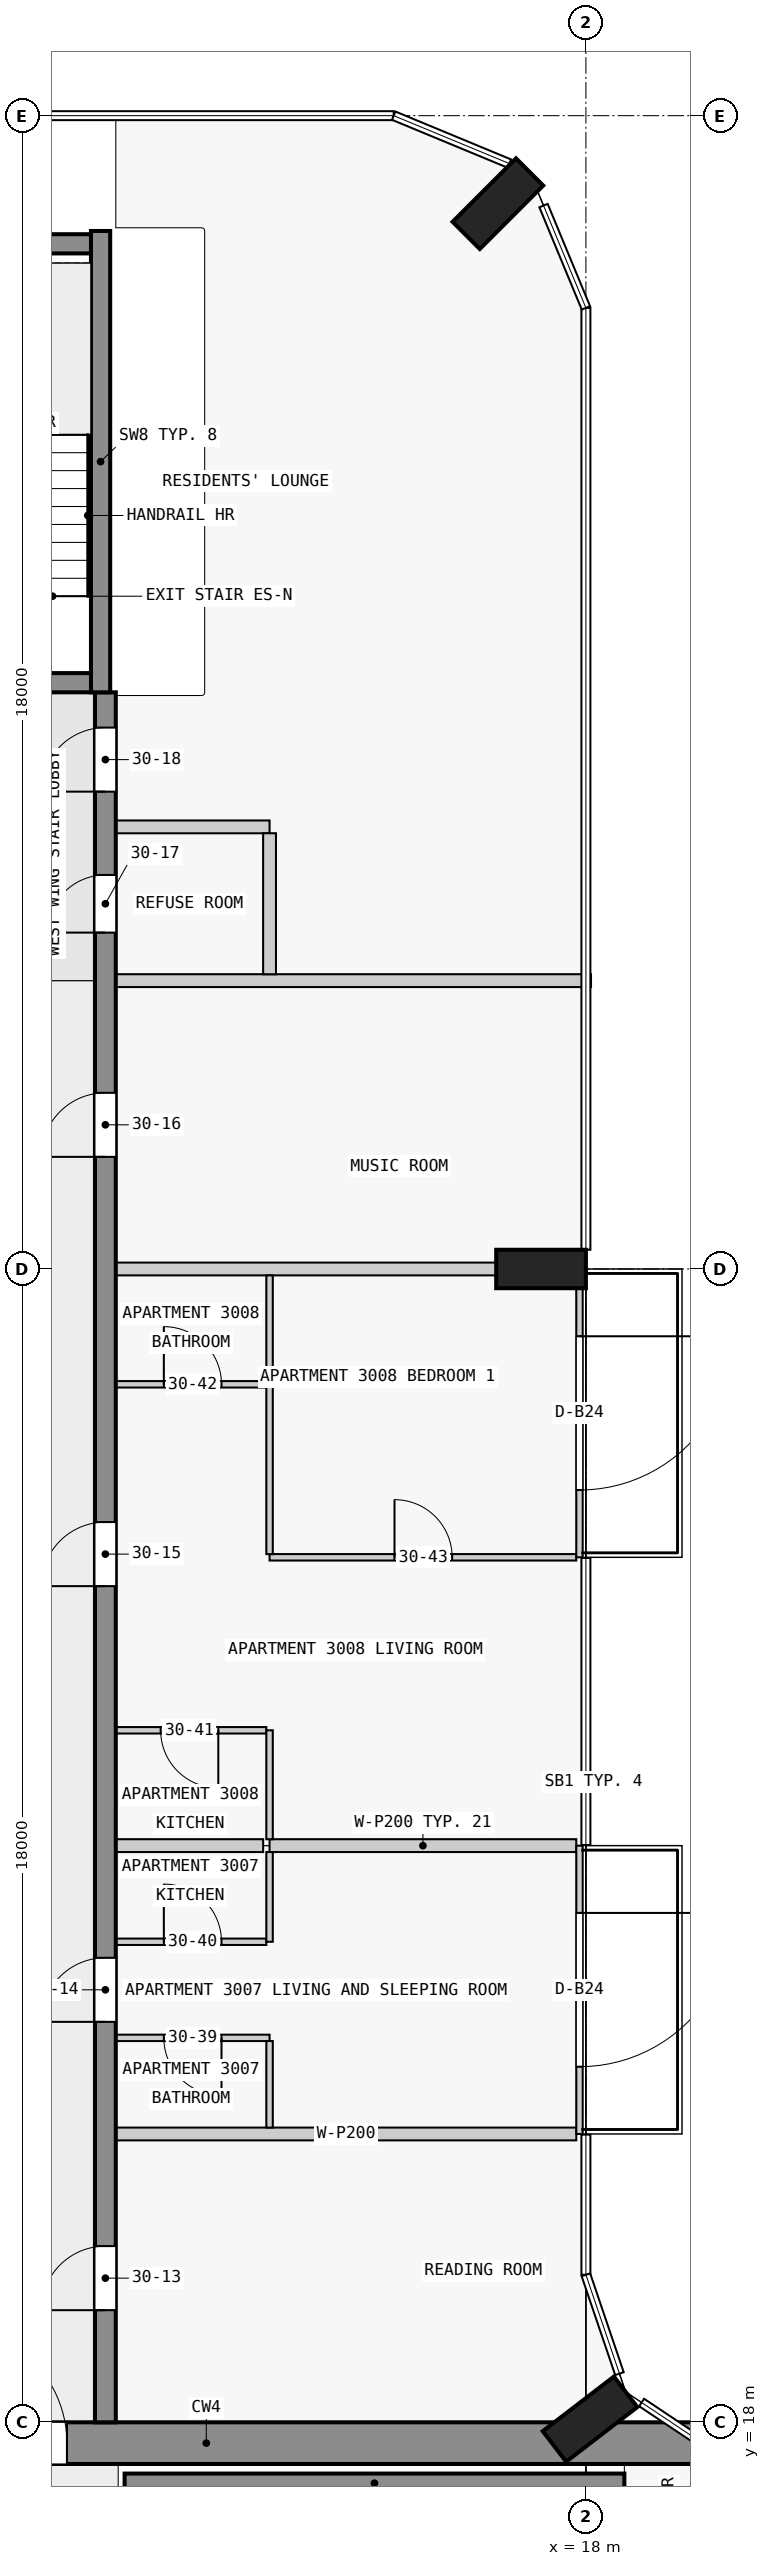
"""IFC4 building model, lengths in metres.
Left out: names, types, materials, properties, quantities, classifications, styles, units other than length and angle.
Written with IfcOpenShell. Run it as: python <this file> out.ifc"""

import sys

from ifc_helpers import new_model, si_unit, direction, frame, frame_2d, origin, origin_2d, place, context, subcontext, project, spatial, rectangle, extrude, element, fill, save


model = new_model("IFC4")
c1 = context("Model", 3, precision=1e-05, world=origin(), true_north=direction((0.0, 1.0)))
c2 = subcontext(c1, "Body", "Model", "MODEL_VIEW")
j1 = project(units=[si_unit("LENGTHUNIT", "METRE"), si_unit("PLANEANGLEUNIT", "RADIAN")], contexts=[c1])
p1 = place(None, origin())
s1 = spatial("IfcSite", under=j1, at=p1, CompositionType="ELEMENT")
p2 = place(p1, origin())
s2 = spatial("IfcBuilding", under=s1, at=p2, CompositionType="ELEMENT")
p3 = place(p2, frame((0.0, 0.0, 116.8)))
s3 = spatial("IfcBuildingStorey", under=s2, at=p3, CompositionType="ELEMENT", Elevation=116.8)
for number, where, z_axis, x_axis in (
    (1, (18.065, 18.05, 0.0), (0.0, 0.0, 1.0), (-0.609, 0.793, 0.0)),
    (2, (17.3, 36.0, 0.0), (0.0, 0.0, 1.0), (0.0, 1.0, 0.0)),
    (3, (16.626, 52.626, 0.0), (0.0, 0.0, 1.0), (-0.707, 0.707, 0.0)),
):
    element("IfcColumn", number, at=place(p3, frame(where, z_axis=z_axis, x_axis=x_axis)), inside=s3, PredefinedType="COLUMN", context=c2, shape_type="SweptSolid", body=[
        extrude(rectangle(XDim=0.6, YDim=1.4, at=origin_2d()), origin(), (0.0, 0.0, 1.0), 3.5),
    ])
p4 = place(p3, frame((1.65, 17.675, 0.0), z_axis=(0.0, 0.0, 1.0), x_axis=(1.0, 0.0, 0.0)))
e4 = element("IfcWall", 4, at=p4, inside=s3, PredefinedType="SHEAR", context=c2, shape_type="SweptSolid", body=[
    extrude(rectangle(XDim=20.85, YDim=0.65, at=frame_2d((10.425, 0.0))), origin(), (0.0, 0.0, 1.0), 3.25),
])
p5 = place(p4, frame((6.45, 0.0, 0.0)))
e5 = element("IfcOpeningElement", 5, at=p5, cuts=e4, PredefinedType="OPENING", context=c2, shape_type="SweptSolid", body=[
    extrude(rectangle(XDim=1.8, YDim=2.1, at=frame_2d((0.9, 1.05))), frame((0.0, 0.335, 0.0), z_axis=(0.0, -1.0, 0.0), x_axis=(1.0, 0.0, 0.0)), (0.0, 0.0, 1.0), 0.67),
])
p6 = place(p3, frame((10.8, 17.05, 0.0), z_axis=(0.0, 0.0, 1.0), x_axis=(1.0, 0.0, 0.0)))
e6 = element("IfcWall", 6, at=p6, inside=s3, PredefinedType="SHEAR", context=c2, shape_type="SweptSolid", body=[
    extrude(rectangle(XDim=7.8, YDim=0.3, at=frame_2d((3.9, 0.0))), origin(), (0.0, 0.0, 1.0), 3.25),
])
p7 = place(p3, frame((7.725, 45.15, 0.0), z_axis=(0.0, 0.0, 1.0), x_axis=(1.0, 0.0, 0.0)))
e7 = element("IfcWall", 7, at=p7, inside=s3, PredefinedType="SHEAR", context=c2, shape_type="SweptSolid", body=[
    extrude(rectangle(XDim=2.55, YDim=0.3, at=frame_2d((1.275, 0.0))), origin(), (0.0, 0.0, 1.0), 3.5),
])
p8 = place(p7, frame((0.725, 0.0, 0.0)))
e8 = element("IfcOpeningElement", 8, at=p8, cuts=e7, PredefinedType="OPENING", context=c2, shape_type="SweptSolid", body=[
    extrude(rectangle(XDim=1.1, YDim=2.1, at=frame_2d((0.55, 1.05))), frame((0.0, 0.16, 0.0), z_axis=(0.0, -1.0, 0.0), x_axis=(1.0, 0.0, 0.0)), (0.0, 0.0, 1.0), 0.32),
])
p9 = place(p3, frame((7.725, 52.0, 0.0), z_axis=(0.0, 0.0, 1.0), x_axis=(1.0, 0.0, 0.0)))
e9 = element("IfcWall", 9, at=p9, inside=s3, PredefinedType="SHEAR", context=c2, shape_type="SweptSolid", body=[
    extrude(rectangle(XDim=2.55, YDim=0.3, at=frame_2d((1.275, 0.0))), origin(), (0.0, 0.0, 1.0), 3.5),
])
p10 = place(p3, frame((10.425, 45.0, 0.0), z_axis=(0.0, 0.0, 1.0), x_axis=(0.0, 1.0, 0.0)))
e10 = element("IfcWall", 10, at=p10, inside=s3, PredefinedType="SHEAR", context=c2, shape_type="SweptSolid", body=[
    extrude(rectangle(XDim=7.2, YDim=0.3, at=frame_2d((3.6, 0.0))), origin(), (0.0, 0.0, 1.0), 3.5),
])
p11 = place(p3, frame((10.5, 18.0, 0.0), z_axis=(0.0, 0.0, 1.0), x_axis=(0.0, 1.0, 0.0)))
e11 = element("IfcWall", 11, at=p11, inside=s3, PredefinedType="SHEAR", context=c2, shape_type="SweptSolid", body=[
    extrude(rectangle(XDim=27.0, YDim=0.325, at=frame_2d((13.5, 0.0))), origin(), (0.0, 0.0, 1.0), 3.25),
])
p12 = place(p11, frame((1.75, 0.0, 0.0)))
e12 = element("IfcOpeningElement", 12, at=p12, cuts=e11, PredefinedType="OPENING", context=c2, shape_type="SweptSolid", body=[
    extrude(rectangle(XDim=1.0, YDim=2.1, at=frame_2d((0.5, 1.05))), frame((0.0, 0.172, 0.0), z_axis=(0.0, -1.0, 0.0), x_axis=(1.0, 0.0, 0.0)), (0.0, 0.0, 1.0), 0.345),
])
p13 = place(p11, frame((6.25, 0.0, 0.0)))
e13 = element("IfcOpeningElement", 13, at=p13, cuts=e11, PredefinedType="OPENING", context=c2, shape_type="SweptSolid", body=[
    extrude(rectangle(XDim=1.0, YDim=2.1, at=frame_2d((0.5, 1.05))), frame((0.0, 0.172, 0.0), z_axis=(0.0, -1.0, 0.0), x_axis=(1.0, 0.0, 0.0)), (0.0, 0.0, 1.0), 0.345),
])
p14 = place(p11, frame((13.05, 0.0, 0.0)))
e14 = element("IfcOpeningElement", 14, at=p14, cuts=e11, PredefinedType="OPENING", context=c2, shape_type="SweptSolid", body=[
    extrude(rectangle(XDim=1.0, YDim=2.1, at=frame_2d((0.5, 1.05))), frame((0.0, 0.172, 0.0), z_axis=(0.0, -1.0, 0.0), x_axis=(1.0, 0.0, 0.0)), (0.0, 0.0, 1.0), 0.345),
])
p15 = place(p11, frame((19.75, 0.0, 0.0)))
e15 = element("IfcOpeningElement", 15, at=p15, cuts=e11, PredefinedType="OPENING", context=c2, shape_type="SweptSolid", body=[
    extrude(rectangle(XDim=1.0, YDim=2.1, at=frame_2d((0.5, 1.05))), frame((0.0, 0.172, 0.0), z_axis=(0.0, -1.0, 0.0), x_axis=(1.0, 0.0, 0.0)), (0.0, 0.0, 1.0), 0.345),
])
p16 = place(p11, frame((23.25, 0.0, 0.0)))
e16 = element("IfcOpeningElement", 16, at=p16, cuts=e11, PredefinedType="OPENING", context=c2, shape_type="SweptSolid", body=[
    extrude(rectangle(XDim=0.9, YDim=2.1, at=frame_2d((0.45, 1.05))), frame((0.0, 0.172, 0.0), z_axis=(0.0, -1.0, 0.0), x_axis=(1.0, 0.0, 0.0)), (0.0, 0.0, 1.0), 0.345),
])
p17 = place(p11, frame((25.45, 0.0, 0.0)))
e17 = element("IfcOpeningElement", 17, at=p17, cuts=e11, PredefinedType="OPENING", context=c2, shape_type="SweptSolid", body=[
    extrude(rectangle(XDim=1.0, YDim=2.1, at=frame_2d((0.5, 1.05))), frame((0.0, 0.172, 0.0), z_axis=(0.0, -1.0, 0.0), x_axis=(1.0, 0.0, 0.0)), (0.0, 0.0, 1.0), 0.345),
])
p18 = place(p3, frame((17.9, 27.0, 0.0), z_axis=(0.0, 0.0, 1.0), x_axis=(0.0, -1.0, 0.0)))
e18 = element("IfcWall", 18, at=p18, inside=s3, PredefinedType="STANDARD", context=c2, shape_type="SweptSolid", body=[
    extrude(rectangle(XDim=4.5, YDim=0.1, at=frame_2d((2.25, 0.0))), origin(), (0.0, 0.0, 1.0), 3.25),
])
p19 = place(p18, frame((1.05, 0.0, 0.0)))
e19 = element("IfcOpeningElement", 19, at=p19, cuts=e18, PredefinedType="OPENING", context=c2, shape_type="SweptSolid", body=[
    extrude(rectangle(XDim=2.4, YDim=2.4, at=frame_2d((1.2, 1.2))), frame((0.0, 0.06, 0.0), z_axis=(0.0, -1.0, 0.0), x_axis=(1.0, 0.0, 0.0)), (0.0, 0.0, 1.0), 0.12),
])
p20 = place(p3, frame((17.9, 36.0, 0.0), z_axis=(0.0, 0.0, 1.0), x_axis=(0.0, -1.0, 0.0)))
e20 = element("IfcWall", 20, at=p20, inside=s3, PredefinedType="STANDARD", context=c2, shape_type="SweptSolid", body=[
    extrude(rectangle(XDim=4.5, YDim=0.1, at=frame_2d((2.25, 0.0))), origin(), (0.0, 0.0, 1.0), 3.25),
])
p21 = place(p20, frame((1.05, 0.0, 0.0)))
e21 = element("IfcOpeningElement", 21, at=p21, cuts=e20, PredefinedType="OPENING", context=c2, shape_type="SweptSolid", body=[
    extrude(rectangle(XDim=2.4, YDim=2.4, at=frame_2d((1.2, 1.2))), frame((0.0, 0.06, 0.0), z_axis=(0.0, -1.0, 0.0), x_axis=(1.0, 0.0, 0.0)), (0.0, 0.0, 1.0), 0.12),
])
p22 = place(p3, frame((17.85, 22.5, 0.0), z_axis=(0.0, 0.0, 1.0), x_axis=(-1.0, 0.0, 0.0)))
e22 = element("IfcWall", 22, at=p22, inside=s3, PredefinedType="PARTITIONING", context=c2, shape_type="SweptSolid", body=[
    extrude(rectangle(XDim=7.188, YDim=0.2, at=frame_2d((3.594, 0.0))), origin(), (0.0, 0.0, 1.0), 3.25),
])
p23 = place(p3, frame((13.062, 24.0, 0.0), z_axis=(0.0, 0.0, 1.0), x_axis=(-1.0, 0.0, 0.0)))
e23 = element("IfcWall", 23, at=p23, inside=s3, PredefinedType="PARTITIONING", context=c2, shape_type="SweptSolid", body=[
    extrude(rectangle(XDim=2.4, YDim=0.1, at=frame_2d((1.2, 0.0))), origin(), (0.0, 0.0, 1.0), 3.25),
])
p24 = place(p23, frame((0.75, 0.0, 0.0)))
e24 = element("IfcOpeningElement", 24, at=p24, cuts=e23, PredefinedType="OPENING", context=c2, shape_type="SweptSolid", body=[
    extrude(rectangle(XDim=0.9, YDim=2.1, at=frame_2d((0.45, 1.05))), frame((0.0, 0.06, 0.0), z_axis=(0.0, -1.0, 0.0), x_axis=(1.0, 0.0, 0.0)), (0.0, 0.0, 1.0), 0.12),
])
p25 = place(p3, frame((10.663, 25.5, 0.0), z_axis=(0.0, 0.0, 1.0), x_axis=(1.0, 0.0, 0.0)))
e25 = element("IfcWall", 25, at=p25, inside=s3, PredefinedType="PARTITIONING", context=c2, shape_type="SweptSolid", body=[
    extrude(rectangle(XDim=2.35, YDim=0.1, at=frame_2d((1.175, 0.0))), origin(), (0.0, 0.0, 1.0), 3.25),
])
p26 = place(p25, frame((0.75, 0.0, 0.0)))
e26 = element("IfcOpeningElement", 26, at=p26, cuts=e25, PredefinedType="OPENING", context=c2, shape_type="SweptSolid", body=[
    extrude(rectangle(XDim=0.9, YDim=2.1, at=frame_2d((0.45, 1.05))), frame((0.0, 0.06, 0.0), z_axis=(0.0, -1.0, 0.0), x_axis=(1.0, 0.0, 0.0)), (0.0, 0.0, 1.0), 0.12),
])
p27 = place(p3, frame((12.962, 27.0, 0.0), z_axis=(0.0, 0.0, 1.0), x_axis=(-1.0, 0.0, 0.0)))
e27 = element("IfcWall", 27, at=p27, inside=s3, PredefinedType="PARTITIONING", context=c2, shape_type="SweptSolid", body=[
    extrude(rectangle(XDim=2.3, YDim=0.2, at=frame_2d((1.15, 0.0))), origin(), (0.0, 0.0, 1.0), 3.25),
])
p28 = place(p3, frame((13.062, 27.0, 0.0), z_axis=(0.0, 0.0, 1.0), x_axis=(1.0, 0.0, 0.0)))
e28 = element("IfcWall", 28, at=p28, inside=s3, PredefinedType="PARTITIONING", context=c2, shape_type="SweptSolid", body=[
    extrude(rectangle(XDim=4.788, YDim=0.2, at=frame_2d((2.394, 0.0))), origin(), (0.0, 0.0, 1.0), 3.25),
])
p29 = place(p3, frame((13.012, 28.8, 0.0), z_axis=(0.0, 0.0, 1.0), x_axis=(-1.0, 0.0, 0.0)))
e29 = element("IfcWall", 29, at=p29, inside=s3, PredefinedType="PARTITIONING", context=c2, shape_type="SweptSolid", body=[
    extrude(rectangle(XDim=2.35, YDim=0.1, at=frame_2d((1.175, 0.0))), origin(), (0.0, 0.0, 1.0), 3.25),
])
p30 = place(p29, frame((0.75, 0.0, 0.0)))
e30 = element("IfcOpeningElement", 30, at=p30, cuts=e29, PredefinedType="OPENING", context=c2, shape_type="SweptSolid", body=[
    extrude(rectangle(XDim=0.9, YDim=2.1, at=frame_2d((0.45, 1.05))), frame((0.0, 0.06, 0.0), z_axis=(0.0, -1.0, 0.0), x_axis=(1.0, 0.0, 0.0)), (0.0, 0.0, 1.0), 0.12),
])
p31 = place(p3, frame((13.062, 31.5, 0.0), z_axis=(0.0, 0.0, 1.0), x_axis=(1.0, 0.0, 0.0)))
e31 = element("IfcWall", 31, at=p31, inside=s3, PredefinedType="PARTITIONING", context=c2, shape_type="SweptSolid", body=[
    extrude(rectangle(XDim=4.788, YDim=0.1, at=frame_2d((2.394, 0.0))), origin(), (0.0, 0.0, 1.0), 3.25),
])
p32 = place(p31, frame((1.95, 0.0, 0.0)))
e32 = element("IfcOpeningElement", 32, at=p32, cuts=e31, PredefinedType="OPENING", context=c2, shape_type="SweptSolid", body=[
    extrude(rectangle(XDim=0.9, YDim=2.1, at=frame_2d((0.45, 1.05))), frame((0.0, 0.06, 0.0), z_axis=(0.0, -1.0, 0.0), x_axis=(1.0, 0.0, 0.0)), (0.0, 0.0, 1.0), 0.12),
])
p33 = place(p3, frame((10.663, 34.2, 0.0), z_axis=(0.0, 0.0, 1.0), x_axis=(1.0, 0.0, 0.0)))
e33 = element("IfcWall", 33, at=p33, inside=s3, PredefinedType="PARTITIONING", context=c2, shape_type="SweptSolid", body=[
    extrude(rectangle(XDim=2.35, YDim=0.1, at=frame_2d((1.175, 0.0))), origin(), (0.0, 0.0, 1.0), 3.25),
])
p34 = place(p33, frame((0.75, 0.0, 0.0)))
e34 = element("IfcOpeningElement", 34, at=p34, cuts=e33, PredefinedType="OPENING", context=c2, shape_type="SweptSolid", body=[
    extrude(rectangle(XDim=0.9, YDim=2.1, at=frame_2d((0.45, 1.05))), frame((0.0, 0.06, 0.0), z_axis=(0.0, -1.0, 0.0), x_axis=(1.0, 0.0, 0.0)), (0.0, 0.0, 1.0), 0.12),
])
p35 = place(p3, frame((16.6, 36.0, 0.0), z_axis=(0.0, 0.0, 1.0), x_axis=(-1.0, 0.0, 0.0)))
e35 = element("IfcWall", 35, at=p35, inside=s3, PredefinedType="PARTITIONING", context=c2, shape_type="SweptSolid", body=[
    extrude(rectangle(XDim=5.938, YDim=0.2, at=frame_2d((2.969, 0.0))), origin(), (0.0, 0.0, 1.0), 3.25),
])
p36 = place(p3, frame((18.08, 40.5, 0.0), z_axis=(0.0, 0.0, 1.0), x_axis=(-1.0, 0.0, 0.0)))
e36 = element("IfcWall", 36, at=p36, inside=s3, PredefinedType="PARTITIONING", context=c2, shape_type="SweptSolid", body=[
    extrude(rectangle(XDim=7.417, YDim=0.2, at=frame_2d((3.709, 0.0))), origin(), (0.0, 0.0, 1.0), 3.25),
])
p37 = place(p3, frame((13.062, 42.9, 0.0), z_axis=(0.0, 0.0, 1.0), x_axis=(-1.0, 0.0, 0.0)))
e37 = element("IfcWall", 37, at=p37, inside=s3, PredefinedType="PARTITIONING", context=c2, shape_type="SweptSolid", body=[
    extrude(rectangle(XDim=2.4, YDim=0.2, at=frame_2d((1.2, 0.0))), origin(), (0.0, 0.0, 1.0), 3.25),
])
p38 = place(p3, frame((13.062, 34.2, 0.0), z_axis=(0.0, 0.0, 1.0), x_axis=(0.0, -1.0, 0.0)))
e38 = element("IfcWall", 38, at=p38, inside=s3, PredefinedType="PARTITIONING", context=c2, shape_type="SweptSolid", body=[
    extrude(rectangle(XDim=2.65, YDim=0.1, at=frame_2d((1.325, 0.0))), origin(), (0.0, 0.0, 1.0), 3.25),
])
p39 = place(p3, frame((13.062, 22.6, 0.0), z_axis=(0.0, 0.0, 1.0), x_axis=(0.0, 1.0, 0.0)))
e39 = element("IfcWall", 39, at=p39, inside=s3, PredefinedType="PARTITIONING", context=c2, shape_type="SweptSolid", body=[
    extrude(rectangle(XDim=1.35, YDim=0.1, at=frame_2d((0.675, 0.0))), origin(), (0.0, 0.0, 1.0), 3.25),
])
p40 = place(p3, frame((13.062, 25.5, 0.0), z_axis=(0.0, 0.0, 1.0), x_axis=(0.0, 1.0, 0.0)))
e40 = element("IfcWall", 40, at=p40, inside=s3, PredefinedType="PARTITIONING", context=c2, shape_type="SweptSolid", body=[
    extrude(rectangle(XDim=1.4, YDim=0.1, at=frame_2d((0.7, 0.0))), origin(), (0.0, 0.0, 1.0), 3.25),
])
p41 = place(p3, frame((13.062, 27.1, 0.0), z_axis=(0.0, 0.0, 1.0), x_axis=(0.0, 1.0, 0.0)))
e41 = element("IfcWall", 41, at=p41, inside=s3, PredefinedType="PARTITIONING", context=c2, shape_type="SweptSolid", body=[
    extrude(rectangle(XDim=1.7, YDim=0.1, at=frame_2d((0.85, 0.0))), origin(), (0.0, 0.0, 1.0), 3.25),
])
p42 = place(p3, frame((13.062, 34.25, 0.0), z_axis=(0.0, 0.0, 1.0), x_axis=(0.0, 1.0, 0.0)))
e42 = element("IfcWall", 42, at=p42, inside=s3, PredefinedType="PARTITIONING", context=c2, shape_type="SweptSolid", body=[
    extrude(rectangle(XDim=1.65, YDim=0.1, at=frame_2d((0.825, 0.0))), origin(), (0.0, 0.0, 1.0), 3.25),
])
p43 = place(p3, frame((13.062, 40.6, 0.0), z_axis=(0.0, 0.0, 1.0), x_axis=(0.0, 1.0, 0.0)))
e43 = element("IfcWall", 43, at=p43, inside=s3, PredefinedType="PARTITIONING", context=c2, shape_type="SweptSolid", body=[
    extrude(rectangle(XDim=2.2, YDim=0.2, at=frame_2d((1.1, 0.0))), origin(), (0.0, 0.0, 1.0), 3.25),
])
p44 = place(p19, origin())
e44 = element("IfcDoor", 44, at=p44, inside=s3, OperationType="SINGLE_SWING_LEFT", PredefinedType="DOOR", context=c2, shape_type="SweptSolid", body=[
    extrude(rectangle(XDim=2.4, YDim=2.4, at=frame_2d((1.2, 1.2))), frame((0.0, 0.025, 0.0), z_axis=(0.0, -1.0, 0.0), x_axis=(1.0, 0.0, 0.0)), (0.0, 0.0, 1.0), 0.05),
])
fill(e19, e44)
p45 = place(p21, origin())
e45 = element("IfcDoor", 45, at=p45, inside=s3, OperationType="SINGLE_SWING_LEFT", PredefinedType="DOOR", context=c2, shape_type="SweptSolid", body=[
    extrude(rectangle(XDim=2.4, YDim=2.4, at=frame_2d((1.2, 1.2))), frame((0.0, 0.025, 0.0), z_axis=(0.0, -1.0, 0.0), x_axis=(1.0, 0.0, 0.0)), (0.0, 0.0, 1.0), 0.05),
])
fill(e21, e45)
p46 = place(p5, origin())
e46 = element("IfcDoor", 46, at=p46, inside=s3, OperationType="DOUBLE_DOOR_SINGLE_SWING", PredefinedType="DOOR", context=c2, shape_type="SweptSolid", body=[
    extrude(rectangle(XDim=1.8, YDim=2.1, at=frame_2d((0.9, 1.05))), frame((0.0, 0.025, 0.0), z_axis=(0.0, -1.0, 0.0), x_axis=(1.0, 0.0, 0.0)), (0.0, 0.0, 1.0), 0.05),
])
fill(e5, e46)
p47 = place(p12, origin())
e47 = element("IfcDoor", 47, at=p47, inside=s3, OperationType="SINGLE_SWING_LEFT", PredefinedType="DOOR", context=c2, shape_type="SweptSolid", body=[
    extrude(rectangle(XDim=1.0, YDim=2.1, at=frame_2d((0.5, 1.05))), frame((0.0, 0.025, 0.0), z_axis=(0.0, -1.0, 0.0), x_axis=(1.0, 0.0, 0.0)), (0.0, 0.0, 1.0), 0.05),
])
fill(e12, e47)
p48 = place(p13, origin())
e48 = element("IfcDoor", 48, at=p48, inside=s3, OperationType="SINGLE_SWING_LEFT", PredefinedType="DOOR", context=c2, shape_type="SweptSolid", body=[
    extrude(rectangle(XDim=1.0, YDim=2.1, at=frame_2d((0.5, 1.05))), frame((0.0, 0.025, 0.0), z_axis=(0.0, -1.0, 0.0), x_axis=(1.0, 0.0, 0.0)), (0.0, 0.0, 1.0), 0.05),
])
fill(e13, e48)
p49 = place(p14, origin())
e49 = element("IfcDoor", 49, at=p49, inside=s3, OperationType="SINGLE_SWING_RIGHT", PredefinedType="DOOR", context=c2, shape_type="SweptSolid", body=[
    extrude(rectangle(XDim=1.0, YDim=2.1, at=frame_2d((0.5, 1.05))), frame((0.0, 0.025, 0.0), z_axis=(0.0, -1.0, 0.0), x_axis=(1.0, 0.0, 0.0)), (0.0, 0.0, 1.0), 0.05),
])
fill(e14, e49)
p50 = place(p15, origin())
e50 = element("IfcDoor", 50, at=p50, inside=s3, OperationType="SINGLE_SWING_RIGHT", PredefinedType="DOOR", context=c2, shape_type="SweptSolid", body=[
    extrude(rectangle(XDim=1.0, YDim=2.1, at=frame_2d((0.5, 1.05))), frame((0.0, 0.025, 0.0), z_axis=(0.0, -1.0, 0.0), x_axis=(1.0, 0.0, 0.0)), (0.0, 0.0, 1.0), 0.05),
])
fill(e15, e50)
p51 = place(p16, origin())
e51 = element("IfcDoor", 51, at=p51, inside=s3, OperationType="SINGLE_SWING_RIGHT", PredefinedType="DOOR", context=c2, shape_type="SweptSolid", body=[
    extrude(rectangle(XDim=0.9, YDim=2.1, at=frame_2d((0.45, 1.05))), frame((0.0, 0.025, 0.0), z_axis=(0.0, -1.0, 0.0), x_axis=(1.0, 0.0, 0.0)), (0.0, 0.0, 1.0), 0.05),
])
fill(e16, e51)
p52 = place(p17, origin())
e52 = element("IfcDoor", 52, at=p52, inside=s3, OperationType="SINGLE_SWING_RIGHT", PredefinedType="DOOR", context=c2, shape_type="SweptSolid", body=[
    extrude(rectangle(XDim=1.0, YDim=2.1, at=frame_2d((0.5, 1.05))), frame((0.0, 0.025, 0.0), z_axis=(0.0, -1.0, 0.0), x_axis=(1.0, 0.0, 0.0)), (0.0, 0.0, 1.0), 0.05),
])
fill(e17, e52)
p53 = place(p24, origin())
e53 = element("IfcDoor", 53, at=p53, inside=s3, OperationType="SINGLE_SWING_LEFT", PredefinedType="DOOR", context=c2, shape_type="SweptSolid", body=[
    extrude(rectangle(XDim=0.9, YDim=2.1, at=frame_2d((0.45, 1.05))), frame((0.0, 0.025, 0.0), z_axis=(0.0, -1.0, 0.0), x_axis=(1.0, 0.0, 0.0)), (0.0, 0.0, 1.0), 0.05),
])
fill(e24, e53)
p54 = place(p26, origin())
e54 = element("IfcDoor", 54, at=p54, inside=s3, OperationType="SINGLE_SWING_RIGHT", PredefinedType="DOOR", context=c2, shape_type="SweptSolid", body=[
    extrude(rectangle(XDim=0.9, YDim=2.1, at=frame_2d((0.45, 1.05))), frame((0.0, 0.025, 0.0), z_axis=(0.0, -1.0, 0.0), x_axis=(1.0, 0.0, 0.0)), (0.0, 0.0, 1.0), 0.05),
])
fill(e26, e54)
p55 = place(p30, origin())
e55 = element("IfcDoor", 55, at=p55, inside=s3, OperationType="SINGLE_SWING_RIGHT", PredefinedType="DOOR", context=c2, shape_type="SweptSolid", body=[
    extrude(rectangle(XDim=0.9, YDim=2.1, at=frame_2d((0.45, 1.05))), frame((0.0, 0.025, 0.0), z_axis=(0.0, -1.0, 0.0), x_axis=(1.0, 0.0, 0.0)), (0.0, 0.0, 1.0), 0.05),
])
fill(e30, e55)
p56 = place(p34, origin())
e56 = element("IfcDoor", 56, at=p56, inside=s3, OperationType="SINGLE_SWING_RIGHT", PredefinedType="DOOR", context=c2, shape_type="SweptSolid", body=[
    extrude(rectangle(XDim=0.9, YDim=2.1, at=frame_2d((0.45, 1.05))), frame((0.0, 0.025, 0.0), z_axis=(0.0, -1.0, 0.0), x_axis=(1.0, 0.0, 0.0)), (0.0, 0.0, 1.0), 0.05),
])
fill(e34, e56)
p57 = place(p32, origin())
e57 = element("IfcDoor", 57, at=p57, inside=s3, OperationType="SINGLE_SWING_RIGHT", PredefinedType="DOOR", context=c2, shape_type="SweptSolid", body=[
    extrude(rectangle(XDim=0.9, YDim=2.1, at=frame_2d((0.45, 1.05))), frame((0.0, 0.025, 0.0), z_axis=(0.0, -1.0, 0.0), x_axis=(1.0, 0.0, 0.0)), (0.0, 0.0, 1.0), 0.05),
])
fill(e32, e57)
save(model, sys.argv[1])
